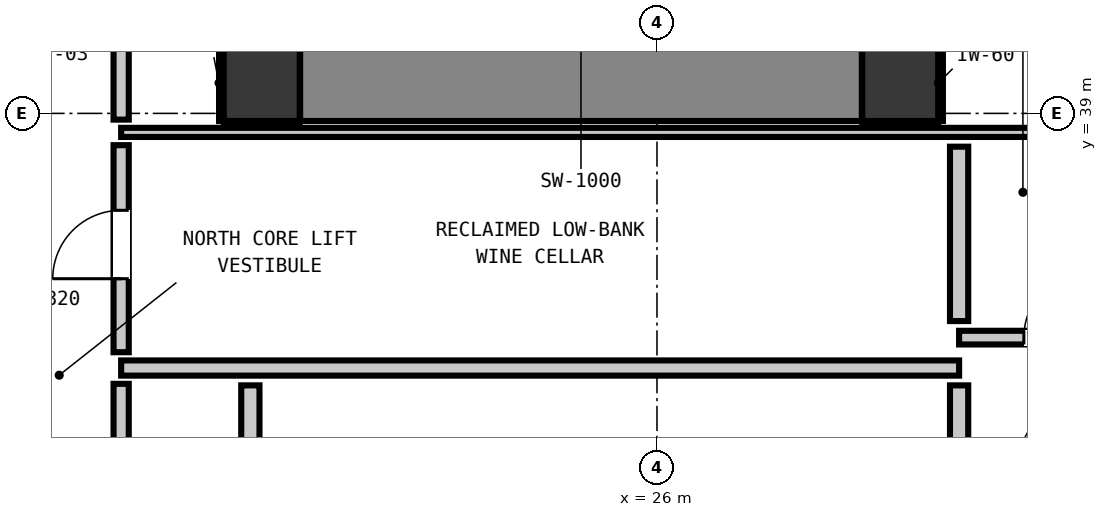
"""IFC4 building model, lengths in metres.
Left out: names, types, materials, properties, quantities, classifications, styles, units other than length and angle.
Written with IfcOpenShell. Run it as: python <this file> out.ifc"""

import sys

from ifc_helpers import new_model, si_unit, direction, frame, frame_2d, origin, origin_2d, place, context, subcontext, project, spatial, rectangle, extrude, element, fill, save


model = new_model("IFC4")
c1 = context("Model", 3, precision=1e-05, world=origin(), true_north=direction((0.0, 1.0)))
c2 = subcontext(c1, "Body", "Model", "MODEL_VIEW")
j1 = project(units=[si_unit("LENGTHUNIT", "METRE"), si_unit("PLANEANGLEUNIT", "RADIAN")], contexts=[c1])
p1 = place(None, origin())
s1 = spatial("IfcSite", under=j1, at=p1, CompositionType="ELEMENT")
p2 = place(p1, origin())
s2 = spatial("IfcBuilding", under=s1, at=p2, CompositionType="ELEMENT")
p3 = place(p2, frame((0.0, 0.0, 145.92)))
s3 = spatial("IfcBuildingStorey", under=s2, at=p3, CompositionType="ELEMENT", Elevation=145.92)
for number, where, z_axis, x_axis in (
    (1, (20.8, 39.4, 0.0), (0.0, 0.0, 1.0), (1.0, 0.0, 0.0)),
    (2, (29.2, 39.4, 0.0), (0.0, 0.0, 1.0), (1.0, 0.0, 0.0)),
):
    element("IfcColumn", number, at=place(p3, frame(where, z_axis=z_axis, x_axis=x_axis)), inside=s3, PredefinedType="COLUMN", context=c2, shape_type="SweptSolid", body=[
        extrude(rectangle(XDim=1.0, YDim=1.0, at=origin_2d()), origin(), (0.0, 0.0, 1.0), 3.32),
    ])
p4 = place(p3, frame((21.305, 39.4, 0.0), z_axis=(0.0, 0.0, 1.0), x_axis=(1.0, 0.0, 0.0)))
e3 = element("IfcWall", 3, at=p4, inside=s3, PredefinedType="SHEAR", context=c2, shape_type="SweptSolid", body=[
    extrude(rectangle(XDim=7.39, YDim=1.0, at=frame_2d((3.695, 0.0))), origin(), (0.0, 0.0, 1.0), 3.32),
])
p5 = place(p3, frame((18.95, 35.65, 0.0), z_axis=(0.0, 0.0, 1.0), x_axis=(1.0, 0.0, 0.0)))
e4 = element("IfcWall", 4, at=p5, inside=s3, PredefinedType="PARTITIONING", context=c2, shape_type="SweptSolid", body=[
    extrude(rectangle(XDim=11.025, YDim=0.2, at=frame_2d((5.513, 0.0))), origin(), (0.0, 0.0, 1.0), 3.08),
])
p6 = place(p3, frame((29.975, 36.05, 0.0), z_axis=(0.0, 0.0, 1.0), x_axis=(1.0, 0.0, 0.0)))
e5 = element("IfcWall", 5, at=p6, inside=s3, PredefinedType="PARTITIONING", context=c2, shape_type="SweptSolid", body=[
    extrude(rectangle(XDim=2.505, YDim=0.18, at=frame_2d((1.252, 0.0))), origin(), (0.0, 0.0, 1.0), 3.08),
])
p7 = place(p6, frame((0.852, 0.0, 0.0)))
e6 = element("IfcOpeningElement", 6, at=p7, cuts=e5, PredefinedType="OPENING", context=c2, shape_type="SweptSolid", body=[
    extrude(rectangle(XDim=0.9, YDim=2.1, at=frame_2d((0.45, 1.05))), frame((0.0, 0.1, 0.0), z_axis=(0.0, -1.0, 0.0), x_axis=(1.0, 0.0, 0.0)), (0.0, 0.0, 1.0), 0.2),
])
p8 = place(p3, frame((18.95, 38.75, 0.0), z_axis=(0.0, 0.0, 1.0), x_axis=(1.0, 0.0, 0.0)))
e7 = element("IfcWall", 7, at=p8, inside=s3, PredefinedType="PARTITIONING", context=c2, shape_type="SweptSolid", body=[
    extrude(rectangle(XDim=13.56, YDim=0.12, at=frame_2d((6.78, 0.0))), origin(), (0.0, 0.0, 1.0), 3.08),
])
p9 = place(p3, frame((20.65, 33.148, 0.0), z_axis=(0.0, 0.0, 1.0), x_axis=(0.0, 1.0, 0.0)))
e8 = element("IfcWall", 8, at=p9, inside=s3, PredefinedType="PARTITIONING", context=c2, shape_type="SweptSolid", body=[
    extrude(rectangle(XDim=2.274, YDim=0.24, at=frame_2d((1.137, 0.0))), origin(), (0.0, 0.0, 1.0), 2.315),
])
p10 = place(p3, frame((29.975, 34.498, 0.0), z_axis=(0.0, 0.0, 1.0), x_axis=(0.0, 1.0, 0.0)))
e9 = element("IfcWall", 9, at=p10, inside=s3, PredefinedType="PARTITIONING", context=c2, shape_type="SweptSolid", body=[
    extrude(rectangle(XDim=0.924, YDim=0.24, at=frame_2d((0.462, 0.0))), origin(), (0.0, 0.0, 1.0), 3.08),
])
p11 = place(p3, frame((29.975, 36.268, 0.0), z_axis=(0.0, 0.0, 1.0), x_axis=(0.0, 1.0, 0.0)))
e10 = element("IfcWall", 10, at=p11, inside=s3, PredefinedType="PARTITIONING", context=c2, shape_type="SweptSolid", body=[
    extrude(rectangle(XDim=2.294, YDim=0.24, at=frame_2d((1.147, 0.0))), origin(), (0.0, 0.0, 1.0), 3.08),
])
p12 = place(p3, frame((18.95, 33.128, 0.0), z_axis=(0.0, 0.0, 1.0), x_axis=(0.0, 1.0, 0.0)))
e11 = element("IfcWall", 11, at=p12, inside=s3, PredefinedType="PARTITIONING", context=c2, shape_type="SweptSolid", body=[
    extrude(rectangle(XDim=2.314, YDim=0.2, at=frame_2d((1.157, 0.0))), origin(), (0.0, 0.0, 1.0), 3.08),
])
p13 = place(p3, frame((18.95, 35.858, 0.0), z_axis=(0.0, 0.0, 1.0), x_axis=(0.0, 1.0, 0.0)))
e12 = element("IfcWall", 12, at=p13, inside=s3, PredefinedType="PARTITIONING", context=c2, shape_type="SweptSolid", body=[
    extrude(rectangle(XDim=2.724, YDim=0.2, at=frame_2d((1.362, 0.0))), origin(), (0.0, 0.0, 1.0), 3.08),
])
p14 = place(p13, frame((0.967, 0.0, 0.0)))
e13 = element("IfcOpeningElement", 13, at=p14, cuts=e12, PredefinedType="OPENING", context=c2, shape_type="SweptSolid", body=[
    extrude(rectangle(XDim=0.9, YDim=2.1, at=frame_2d((0.45, 1.05))), frame((0.0, 0.11, 0.0), z_axis=(0.0, -1.0, 0.0), x_axis=(1.0, 0.0, 0.0)), (0.0, 0.0, 1.0), 0.22),
])
p15 = place(p3, frame((18.95, 38.918, 0.0), z_axis=(0.0, 0.0, 1.0), x_axis=(0.0, 1.0, 0.0)))
e14 = element("IfcWall", 14, at=p15, inside=s3, PredefinedType="PARTITIONING", context=c2, shape_type="SweptSolid", body=[
    extrude(rectangle(XDim=1.134, YDim=0.2, at=frame_2d((0.567, 0.0))), origin(), (0.0, 0.0, 1.0), 3.08),
])
for number, where, z_axis, x_axis in (
    (15, (20.3, 38.868, 0.0), (0.0, 0.0, 1.0), (1.0, 0.0, 0.0)),
    (16, (20.268, 38.9, 0.0), (0.0, 0.0, 1.0), (0.0, 1.0, 0.0)),
    (17, (28.7, 38.868, 0.0), (0.0, 0.0, 1.0), (1.0, 0.0, 0.0)),
    (18, (29.732, 38.9, 0.0), (0.0, 0.0, 1.0), (0.0, 1.0, 0.0)),
):
    element("IfcWall", number, at=place(p3, frame(where, z_axis=z_axis, x_axis=x_axis)), inside=s3, PredefinedType="PARTITIONING", context=c2, shape_type="SweptSolid", body=[
        extrude(rectangle(XDim=1.0, YDim=0.06, at=frame_2d((0.5, 0.0))), origin(), (0.0, 0.0, 1.0), 1.45),
    ])
p16 = place(p7, origin())
e19 = element("IfcDoor", 19, at=p16, inside=s3, OperationType="SINGLE_SWING_RIGHT", PredefinedType="DOOR", context=c2, shape_type="SweptSolid", body=[
    extrude(rectangle(XDim=0.9, YDim=2.1, at=frame_2d((0.45, 1.05))), frame((0.0, 0.025, 0.0), z_axis=(0.0, -1.0, 0.0), x_axis=(1.0, 0.0, 0.0)), (0.0, 0.0, 1.0), 0.05),
])
fill(e6, e19)
p17 = place(p14, origin())
e20 = element("IfcDoor", 20, at=p17, inside=s3, OperationType="SINGLE_SWING_LEFT", PredefinedType="DOOR", context=c2, shape_type="SweptSolid", body=[
    extrude(rectangle(XDim=0.9, YDim=2.1, at=frame_2d((0.45, 1.05))), frame((0.0, 0.025, 0.0), z_axis=(0.0, -1.0, 0.0), x_axis=(1.0, 0.0, 0.0)), (0.0, 0.0, 1.0), 0.05),
])
fill(e13, e20)
save(model, sys.argv[1])
